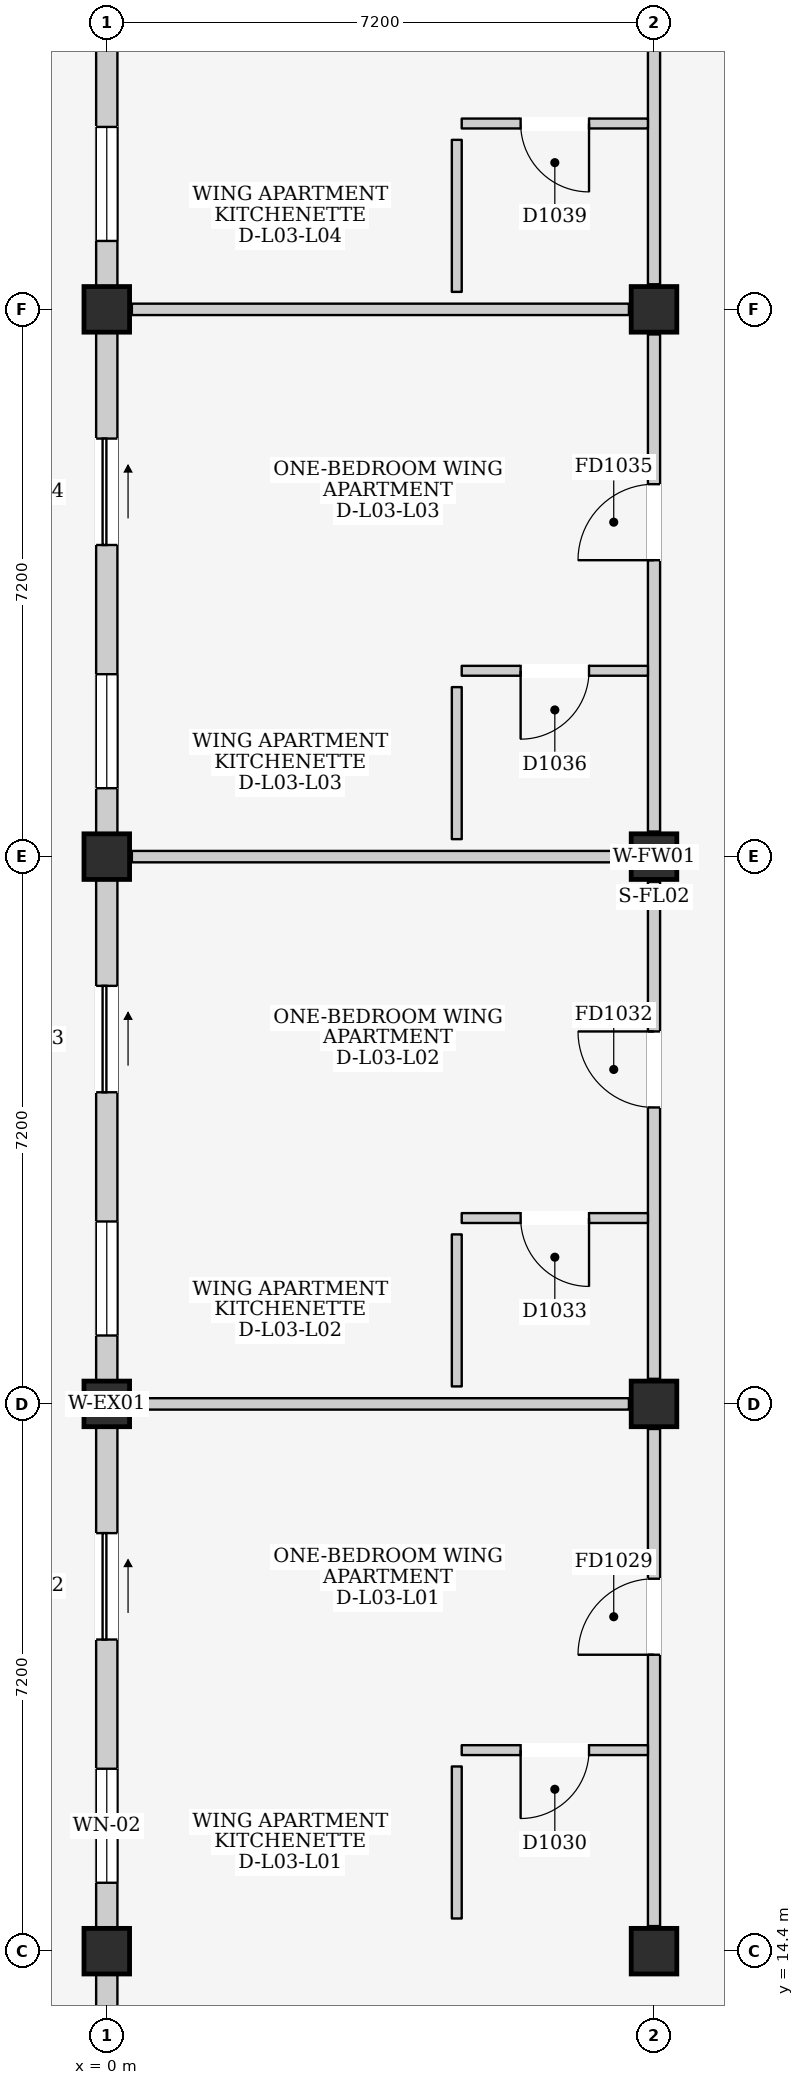
"""IFC4 building model, lengths in metres.
Left out: names, types, materials, properties, quantities, classifications, styles, units other than length and angle.
Written with IfcOpenShell. Run it as: python <this file> out.ifc"""

import sys

from ifc_helpers import new_model, si_unit, direction, frame, frame_2d, origin, origin_2d, place, context, subcontext, project, spatial, rectangle, extrude, element, fill, save


model = new_model("IFC4")
c1 = context("Model", 3, precision=1e-05, world=origin(), true_north=direction((0.0, 1.0)))
c2 = subcontext(c1, "Body", "Model", "MODEL_VIEW")
j1 = project(units=[si_unit("LENGTHUNIT", "METRE"), si_unit("PLANEANGLEUNIT", "RADIAN")], contexts=[c1])
p1 = place(None, origin())
s1 = spatial("IfcSite", under=j1, at=p1, CompositionType="ELEMENT")
p2 = place(p1, origin())
s2 = spatial("IfcBuilding", under=s1, at=p2, CompositionType="ELEMENT")
p3 = place(p2, frame((0.0, 0.0, 12.2)))
s3 = spatial("IfcBuildingStorey", under=s2, at=p3, CompositionType="ELEMENT", Elevation=12.2)
for number, where, z_axis, x_axis in (
    (1, (0.0, 14.4, 0.0), (0.0, 0.0, 1.0), (1.0, 0.0, 0.0)),
    (2, (0.0, 21.6, 0.0), (0.0, 0.0, 1.0), (1.0, 0.0, 0.0)),
    (3, (0.0, 28.8, 0.0), (0.0, 0.0, 1.0), (1.0, 0.0, 0.0)),
    (4, (0.0, 36.0, 0.0), (0.0, 0.0, 1.0), (1.0, 0.0, 0.0)),
    (5, (7.2, 14.4, 0.0), (0.0, 0.0, 1.0), (1.0, 0.0, 0.0)),
    (6, (7.2, 21.6, 0.0), (0.0, 0.0, 1.0), (1.0, 0.0, 0.0)),
    (7, (7.2, 28.8, 0.0), (0.0, 0.0, 1.0), (1.0, 0.0, 0.0)),
    (8, (7.2, 36.0, 0.0), (0.0, 0.0, 1.0), (1.0, 0.0, 0.0)),
):
    element("IfcColumn", number, at=place(p3, frame(where, z_axis=z_axis, x_axis=x_axis)), inside=s3, PredefinedType="COLUMN", context=c2, shape_type="SweptSolid", body=[
        extrude(rectangle(XDim=0.6, YDim=0.6, at=origin_2d()), origin(), (0.0, 0.0, 1.0), 3.2),
    ])
p4 = place(p3, frame((0.0, 7.5, 0.0), z_axis=(0.0, 0.0, 1.0), x_axis=(0.0, 1.0, 0.0)))
e9 = element("IfcWall", 9, at=p4, inside=s3, PredefinedType="ELEMENTEDWALL", context=c2, shape_type="SweptSolid", body=[
    extrude(rectangle(XDim=6.6, YDim=0.28, at=frame_2d((3.3, 0.0))), origin(), (0.0, 0.0, 1.0), 2.445),
])
p5 = place(p4, frame((3.65, 0.0, 0.0)))
e10 = element("IfcOpeningElement", 10, at=p5, cuts=e9, PredefinedType="OPENING", context=c2, shape_type="SweptSolid", body=[
    extrude(rectangle(XDim=1.4, YDim=2.1, at=frame_2d((0.7, 1.05))), frame((0.0, 0.155, 0.0), z_axis=(0.0, -1.0, 0.0), x_axis=(1.0, 0.0, 0.0)), (0.0, 0.0, 1.0), 0.31),
])
p6 = place(p3, frame((0.0, 14.7, 0.0), z_axis=(0.0, 0.0, 1.0), x_axis=(0.0, 1.0, 0.0)))
e11 = element("IfcWall", 11, at=p6, inside=s3, PredefinedType="ELEMENTEDWALL", context=c2, shape_type="SweptSolid", body=[
    extrude(rectangle(XDim=6.6, YDim=0.28, at=frame_2d((3.3, 0.0))), origin(), (0.0, 0.0, 1.0), 2.445),
])
p7 = place(p6, frame((3.8, 0.0, 0.0)))
e12 = element("IfcOpeningElement", 12, at=p7, cuts=e11, PredefinedType="OPENING", context=c2, shape_type="SweptSolid", body=[
    extrude(rectangle(XDim=1.4, YDim=2.1, at=frame_2d((0.7, 1.05))), frame((0.0, 0.155, 0.0), z_axis=(0.0, -1.0, 0.0), x_axis=(1.0, 0.0, 0.0)), (0.0, 0.0, 1.0), 0.31),
])
p8 = place(p6, frame((0.6, 0.0, 0.835)))
e13 = element("IfcOpeningElement", 13, at=p8, cuts=e11, PredefinedType="OPENING", context=c2, shape_type="SweptSolid", body=[
    extrude(rectangle(XDim=1.5, YDim=1.5, at=frame_2d((0.75, 0.75))), frame((0.0, 0.155, 0.0), z_axis=(0.0, -1.0, 0.0), x_axis=(1.0, 0.0, 0.0)), (0.0, 0.0, 1.0), 0.31),
])
p9 = place(p3, frame((0.0, 21.9, 0.0), z_axis=(0.0, 0.0, 1.0), x_axis=(0.0, 1.0, 0.0)))
e14 = element("IfcWall", 14, at=p9, inside=s3, PredefinedType="ELEMENTEDWALL", context=c2, shape_type="SweptSolid", body=[
    extrude(rectangle(XDim=6.6, YDim=0.28, at=frame_2d((3.3, 0.0))), origin(), (0.0, 0.0, 1.0), 2.445),
])
p10 = place(p9, frame((3.8, 0.0, 0.0)))
e15 = element("IfcOpeningElement", 15, at=p10, cuts=e14, PredefinedType="OPENING", context=c2, shape_type="SweptSolid", body=[
    extrude(rectangle(XDim=1.4, YDim=2.1, at=frame_2d((0.7, 1.05))), frame((0.0, 0.155, 0.0), z_axis=(0.0, -1.0, 0.0), x_axis=(1.0, 0.0, 0.0)), (0.0, 0.0, 1.0), 0.31),
])
p11 = place(p9, frame((0.6, 0.0, 0.835)))
e16 = element("IfcOpeningElement", 16, at=p11, cuts=e14, PredefinedType="OPENING", context=c2, shape_type="SweptSolid", body=[
    extrude(rectangle(XDim=1.5, YDim=1.5, at=frame_2d((0.75, 0.75))), frame((0.0, 0.155, 0.0), z_axis=(0.0, -1.0, 0.0), x_axis=(1.0, 0.0, 0.0)), (0.0, 0.0, 1.0), 0.31),
])
p12 = place(p3, frame((0.0, 29.1, 0.0), z_axis=(0.0, 0.0, 1.0), x_axis=(0.0, 1.0, 0.0)))
e17 = element("IfcWall", 17, at=p12, inside=s3, PredefinedType="ELEMENTEDWALL", context=c2, shape_type="SweptSolid", body=[
    extrude(rectangle(XDim=6.6, YDim=0.28, at=frame_2d((3.3, 0.0))), origin(), (0.0, 0.0, 1.0), 2.445),
])
p13 = place(p12, frame((3.8, 0.0, 0.0)))
e18 = element("IfcOpeningElement", 18, at=p13, cuts=e17, PredefinedType="OPENING", context=c2, shape_type="SweptSolid", body=[
    extrude(rectangle(XDim=1.4, YDim=2.1, at=frame_2d((0.7, 1.05))), frame((0.0, 0.155, 0.0), z_axis=(0.0, -1.0, 0.0), x_axis=(1.0, 0.0, 0.0)), (0.0, 0.0, 1.0), 0.31),
])
p14 = place(p12, frame((0.6, 0.0, 0.835)))
e19 = element("IfcOpeningElement", 19, at=p14, cuts=e17, PredefinedType="OPENING", context=c2, shape_type="SweptSolid", body=[
    extrude(rectangle(XDim=1.5, YDim=1.5, at=frame_2d((0.75, 0.75))), frame((0.0, 0.155, 0.0), z_axis=(0.0, -1.0, 0.0), x_axis=(1.0, 0.0, 0.0)), (0.0, 0.0, 1.0), 0.31),
])
p15 = place(p3, frame((0.0, 36.3, 0.0), z_axis=(0.0, 0.0, 1.0), x_axis=(0.0, 1.0, 0.0)))
e20 = element("IfcWall", 20, at=p15, inside=s3, PredefinedType="ELEMENTEDWALL", context=c2, shape_type="SweptSolid", body=[
    extrude(rectangle(XDim=6.6, YDim=0.28, at=frame_2d((3.3, 0.0))), origin(), (0.0, 0.0, 1.0), 2.445),
])
p16 = place(p15, frame((3.8, 0.0, 0.0)))
e21 = element("IfcOpeningElement", 21, at=p16, cuts=e20, PredefinedType="OPENING", context=c2, shape_type="SweptSolid", body=[
    extrude(rectangle(XDim=1.4, YDim=2.1, at=frame_2d((0.7, 1.05))), frame((0.0, 0.155, 0.0), z_axis=(0.0, -1.0, 0.0), x_axis=(1.0, 0.0, 0.0)), (0.0, 0.0, 1.0), 0.31),
])
p17 = place(p15, frame((0.6, 0.0, 0.835)))
e22 = element("IfcOpeningElement", 22, at=p17, cuts=e20, PredefinedType="OPENING", context=c2, shape_type="SweptSolid", body=[
    extrude(rectangle(XDim=1.5, YDim=1.5, at=frame_2d((0.75, 0.75))), frame((0.0, 0.155, 0.0), z_axis=(0.0, -1.0, 0.0), x_axis=(1.0, 0.0, 0.0)), (0.0, 0.0, 1.0), 0.31),
])
p18 = place(p3, frame((7.2, 14.73, 0.0), z_axis=(0.0, 0.0, 1.0), x_axis=(0.0, 1.0, 0.0)))
e23 = element("IfcWall", 23, at=p18, inside=s3, PredefinedType="PARTITIONING", context=c2, shape_type="SweptSolid", body=[
    extrude(rectangle(XDim=6.54, YDim=0.16, at=frame_2d((3.27, 0.0))), origin(), (0.0, 0.0, 1.0), 2.415),
])
p19 = place(p18, frame((3.57, 0.0, 0.0)))
e24 = element("IfcOpeningElement", 24, at=p19, cuts=e23, PredefinedType="OPENING", context=c2, shape_type="SweptSolid", body=[
    extrude(rectangle(XDim=1.0, YDim=2.15, at=frame_2d((0.5, 1.075))), frame((0.0, 0.095, 0.0), z_axis=(0.0, -1.0, 0.0), x_axis=(1.0, 0.0, 0.0)), (0.0, 0.0, 1.0), 0.19),
])
p20 = place(p3, frame((0.33, 21.6, 0.0), z_axis=(0.0, 0.0, 1.0), x_axis=(1.0, 0.0, 0.0)))
e25 = element("IfcWall", 25, at=p20, inside=s3, PredefinedType="PARTITIONING", context=c2, shape_type="SweptSolid", body=[
    extrude(rectangle(XDim=6.54, YDim=0.15, at=frame_2d((3.27, 0.0))), origin(), (0.0, 0.0, 1.0), 2.365),
])
p21 = place(p3, frame((4.67, 17.045, 0.0), z_axis=(0.0, 0.0, 1.0), x_axis=(1.0, 0.0, 0.0)))
e26 = element("IfcWall", 26, at=p21, inside=s3, PredefinedType="PARTITIONING", context=c2, shape_type="SweptSolid", body=[
    extrude(rectangle(XDim=2.45, YDim=0.13, at=frame_2d((1.225, 0.0))), origin(), (0.0, 0.0, 1.0), 2.98),
])
p22 = place(p21, frame((0.775, 0.0, 0.0)))
e27 = element("IfcOpeningElement", 27, at=p22, cuts=e26, PredefinedType="OPENING", context=c2, shape_type="SweptSolid", body=[
    extrude(rectangle(XDim=0.9, YDim=2.1, at=frame_2d((0.45, 1.05))), frame((0.0, 0.08, 0.0), z_axis=(0.0, -1.0, 0.0), x_axis=(1.0, 0.0, 0.0)), (0.0, 0.0, 1.0), 0.16),
])
p23 = place(p3, frame((4.605, 14.83, 0.0), z_axis=(0.0, 0.0, 1.0), x_axis=(0.0, 1.0, 0.0)))
e28 = element("IfcWall", 28, at=p23, inside=s3, PredefinedType="PARTITIONING", context=c2, shape_type="SweptSolid", body=[
    extrude(rectangle(XDim=2.0, YDim=0.13, at=frame_2d((1.0, 0.0))), origin(), (0.0, 0.0, 1.0), 2.98),
])
p24 = place(p3, frame((7.2, 21.93, 0.0), z_axis=(0.0, 0.0, 1.0), x_axis=(0.0, 1.0, 0.0)))
e29 = element("IfcWall", 29, at=p24, inside=s3, PredefinedType="PARTITIONING", context=c2, shape_type="SweptSolid", body=[
    extrude(rectangle(XDim=6.54, YDim=0.16, at=frame_2d((3.27, 0.0))), origin(), (0.0, 0.0, 1.0), 2.415),
])
p25 = place(p24, frame((3.57, 0.0, 0.0)))
e30 = element("IfcOpeningElement", 30, at=p25, cuts=e29, PredefinedType="OPENING", context=c2, shape_type="SweptSolid", body=[
    extrude(rectangle(XDim=1.0, YDim=2.15, at=frame_2d((0.5, 1.075))), frame((0.0, 0.095, 0.0), z_axis=(0.0, -1.0, 0.0), x_axis=(1.0, 0.0, 0.0)), (0.0, 0.0, 1.0), 0.19),
])
p26 = place(p3, frame((0.33, 28.8, 0.0), z_axis=(0.0, 0.0, 1.0), x_axis=(1.0, 0.0, 0.0)))
e31 = element("IfcWall", 31, at=p26, inside=s3, PredefinedType="PARTITIONING", context=c2, shape_type="SweptSolid", body=[
    extrude(rectangle(XDim=6.54, YDim=0.15, at=frame_2d((3.27, 0.0))), origin(), (0.0, 0.0, 1.0), 2.365),
])
p27 = place(p3, frame((4.67, 24.045, 0.0), z_axis=(0.0, 0.0, 1.0), x_axis=(1.0, 0.0, 0.0)))
e32 = element("IfcWall", 32, at=p27, inside=s3, PredefinedType="PARTITIONING", context=c2, shape_type="SweptSolid", body=[
    extrude(rectangle(XDim=2.45, YDim=0.13, at=frame_2d((1.225, 0.0))), origin(), (0.0, 0.0, 1.0), 2.98),
])
p28 = place(p27, frame((0.775, 0.0, 0.0)))
e33 = element("IfcOpeningElement", 33, at=p28, cuts=e32, PredefinedType="OPENING", context=c2, shape_type="SweptSolid", body=[
    extrude(rectangle(XDim=0.9, YDim=2.1, at=frame_2d((0.45, 1.05))), frame((0.0, 0.08, 0.0), z_axis=(0.0, -1.0, 0.0), x_axis=(1.0, 0.0, 0.0)), (0.0, 0.0, 1.0), 0.16),
])
p29 = place(p3, frame((4.605, 21.83, 0.0), z_axis=(0.0, 0.0, 1.0), x_axis=(0.0, 1.0, 0.0)))
e34 = element("IfcWall", 34, at=p29, inside=s3, PredefinedType="PARTITIONING", context=c2, shape_type="SweptSolid", body=[
    extrude(rectangle(XDim=2.0, YDim=0.13, at=frame_2d((1.0, 0.0))), origin(), (0.0, 0.0, 1.0), 2.98),
])
p30 = place(p3, frame((7.2, 29.13, 0.0), z_axis=(0.0, 0.0, 1.0), x_axis=(0.0, 1.0, 0.0)))
e35 = element("IfcWall", 35, at=p30, inside=s3, PredefinedType="PARTITIONING", context=c2, shape_type="SweptSolid", body=[
    extrude(rectangle(XDim=6.54, YDim=0.16, at=frame_2d((3.27, 0.0))), origin(), (0.0, 0.0, 1.0), 2.415),
])
p31 = place(p30, frame((3.57, 0.0, 0.0)))
e36 = element("IfcOpeningElement", 36, at=p31, cuts=e35, PredefinedType="OPENING", context=c2, shape_type="SweptSolid", body=[
    extrude(rectangle(XDim=1.0, YDim=2.15, at=frame_2d((0.5, 1.075))), frame((0.0, 0.095, 0.0), z_axis=(0.0, -1.0, 0.0), x_axis=(1.0, 0.0, 0.0)), (0.0, 0.0, 1.0), 0.19),
])
p32 = place(p3, frame((0.33, 36.0, 0.0), z_axis=(0.0, 0.0, 1.0), x_axis=(1.0, 0.0, 0.0)))
e37 = element("IfcWall", 37, at=p32, inside=s3, PredefinedType="PARTITIONING", context=c2, shape_type="SweptSolid", body=[
    extrude(rectangle(XDim=6.54, YDim=0.15, at=frame_2d((3.27, 0.0))), origin(), (0.0, 0.0, 1.0), 2.365),
])
p33 = place(p3, frame((4.67, 31.245, 0.0), z_axis=(0.0, 0.0, 1.0), x_axis=(1.0, 0.0, 0.0)))
e38 = element("IfcWall", 38, at=p33, inside=s3, PredefinedType="PARTITIONING", context=c2, shape_type="SweptSolid", body=[
    extrude(rectangle(XDim=2.45, YDim=0.13, at=frame_2d((1.225, 0.0))), origin(), (0.0, 0.0, 1.0), 2.98),
])
p34 = place(p33, frame((0.775, 0.0, 0.0)))
e39 = element("IfcOpeningElement", 39, at=p34, cuts=e38, PredefinedType="OPENING", context=c2, shape_type="SweptSolid", body=[
    extrude(rectangle(XDim=0.9, YDim=2.1, at=frame_2d((0.45, 1.05))), frame((0.0, 0.08, 0.0), z_axis=(0.0, -1.0, 0.0), x_axis=(1.0, 0.0, 0.0)), (0.0, 0.0, 1.0), 0.16),
])
p35 = place(p3, frame((4.605, 29.03, 0.0), z_axis=(0.0, 0.0, 1.0), x_axis=(0.0, 1.0, 0.0)))
e40 = element("IfcWall", 40, at=p35, inside=s3, PredefinedType="PARTITIONING", context=c2, shape_type="SweptSolid", body=[
    extrude(rectangle(XDim=2.0, YDim=0.13, at=frame_2d((1.0, 0.0))), origin(), (0.0, 0.0, 1.0), 2.98),
])
p36 = place(p3, frame((7.2, 36.33, 0.0), z_axis=(0.0, 0.0, 1.0), x_axis=(0.0, 1.0, 0.0)))
e41 = element("IfcWall", 41, at=p36, inside=s3, PredefinedType="PARTITIONING", context=c2, shape_type="SweptSolid", body=[
    extrude(rectangle(XDim=6.54, YDim=0.16, at=frame_2d((3.27, 0.0))), origin(), (0.0, 0.0, 1.0), 2.415),
])
p37 = place(p36, frame((3.57, 0.0, 0.0)))
e42 = element("IfcOpeningElement", 42, at=p37, cuts=e41, PredefinedType="OPENING", context=c2, shape_type="SweptSolid", body=[
    extrude(rectangle(XDim=1.0, YDim=2.15, at=frame_2d((0.5, 1.075))), frame((0.0, 0.095, 0.0), z_axis=(0.0, -1.0, 0.0), x_axis=(1.0, 0.0, 0.0)), (0.0, 0.0, 1.0), 0.19),
])
p38 = place(p3, frame((4.67, 38.445, 0.0), z_axis=(0.0, 0.0, 1.0), x_axis=(1.0, 0.0, 0.0)))
e43 = element("IfcWall", 43, at=p38, inside=s3, PredefinedType="PARTITIONING", context=c2, shape_type="SweptSolid", body=[
    extrude(rectangle(XDim=2.45, YDim=0.13, at=frame_2d((1.225, 0.0))), origin(), (0.0, 0.0, 1.0), 2.98),
])
p39 = place(p38, frame((0.775, 0.0, 0.0)))
e44 = element("IfcOpeningElement", 44, at=p39, cuts=e43, PredefinedType="OPENING", context=c2, shape_type="SweptSolid", body=[
    extrude(rectangle(XDim=0.9, YDim=2.1, at=frame_2d((0.45, 1.05))), frame((0.0, 0.08, 0.0), z_axis=(0.0, -1.0, 0.0), x_axis=(1.0, 0.0, 0.0)), (0.0, 0.0, 1.0), 0.16),
])
p40 = place(p3, frame((4.605, 36.23, 0.0), z_axis=(0.0, 0.0, 1.0), x_axis=(0.0, 1.0, 0.0)))
e45 = element("IfcWall", 45, at=p40, inside=s3, PredefinedType="PARTITIONING", context=c2, shape_type="SweptSolid", body=[
    extrude(rectangle(XDim=2.0, YDim=0.13, at=frame_2d((1.0, 0.0))), origin(), (0.0, 0.0, 1.0), 2.98),
])
p41 = place(p7, frame((1.4, 0.0, 0.0), z_axis=(0.0, 0.0, 1.0), x_axis=(-1.0, 0.0, 0.0)))
e46 = element("IfcDoor", 46, at=p41, inside=s3, OperationType="SLIDING_TO_RIGHT", PredefinedType="DOOR", context=c2, shape_type="SweptSolid", body=[
    extrude(rectangle(XDim=1.4, YDim=2.1, at=frame_2d((0.7, 1.05))), frame((0.0, 0.025, 0.0), z_axis=(0.0, -1.0, 0.0), x_axis=(1.0, 0.0, 0.0)), (0.0, 0.0, 1.0), 0.05),
])
fill(e12, e46)
p42 = place(p8, origin())
e47 = element("IfcWindow", 47, at=p42, inside=s3, PartitioningType="DOUBLE_PANEL_VERTICAL", PredefinedType="WINDOW", context=c2, shape_type="SweptSolid", body=[
    extrude(rectangle(XDim=1.5, YDim=1.5, at=frame_2d((0.75, 0.75))), frame((0.0, 0.03, 0.0), z_axis=(0.0, -1.0, 0.0), x_axis=(1.0, 0.0, 0.0)), (0.0, 0.0, 1.0), 0.06),
])
fill(e13, e47)
p43 = place(p10, frame((1.4, 0.0, 0.0), z_axis=(0.0, 0.0, 1.0), x_axis=(-1.0, 0.0, 0.0)))
e48 = element("IfcDoor", 48, at=p43, inside=s3, OperationType="SLIDING_TO_RIGHT", PredefinedType="DOOR", context=c2, shape_type="SweptSolid", body=[
    extrude(rectangle(XDim=1.4, YDim=2.1, at=frame_2d((0.7, 1.05))), frame((0.0, 0.025, 0.0), z_axis=(0.0, -1.0, 0.0), x_axis=(1.0, 0.0, 0.0)), (0.0, 0.0, 1.0), 0.05),
])
fill(e15, e48)
p44 = place(p11, origin())
e49 = element("IfcWindow", 49, at=p44, inside=s3, PartitioningType="DOUBLE_PANEL_VERTICAL", PredefinedType="WINDOW", context=c2, shape_type="SweptSolid", body=[
    extrude(rectangle(XDim=1.5, YDim=1.5, at=frame_2d((0.75, 0.75))), frame((0.0, 0.03, 0.0), z_axis=(0.0, -1.0, 0.0), x_axis=(1.0, 0.0, 0.0)), (0.0, 0.0, 1.0), 0.06),
])
fill(e16, e49)
p45 = place(p13, frame((1.4, 0.0, 0.0), z_axis=(0.0, 0.0, 1.0), x_axis=(-1.0, 0.0, 0.0)))
e50 = element("IfcDoor", 50, at=p45, inside=s3, OperationType="SLIDING_TO_RIGHT", PredefinedType="DOOR", context=c2, shape_type="SweptSolid", body=[
    extrude(rectangle(XDim=1.4, YDim=2.1, at=frame_2d((0.7, 1.05))), frame((0.0, 0.025, 0.0), z_axis=(0.0, -1.0, 0.0), x_axis=(1.0, 0.0, 0.0)), (0.0, 0.0, 1.0), 0.05),
])
fill(e18, e50)
p46 = place(p14, origin())
e51 = element("IfcWindow", 51, at=p46, inside=s3, PartitioningType="DOUBLE_PANEL_VERTICAL", PredefinedType="WINDOW", context=c2, shape_type="SweptSolid", body=[
    extrude(rectangle(XDim=1.5, YDim=1.5, at=frame_2d((0.75, 0.75))), frame((0.0, 0.03, 0.0), z_axis=(0.0, -1.0, 0.0), x_axis=(1.0, 0.0, 0.0)), (0.0, 0.0, 1.0), 0.06),
])
fill(e19, e51)
p47 = place(p17, origin())
e52 = element("IfcWindow", 52, at=p47, inside=s3, PartitioningType="DOUBLE_PANEL_VERTICAL", PredefinedType="WINDOW", context=c2, shape_type="SweptSolid", body=[
    extrude(rectangle(XDim=1.5, YDim=1.5, at=frame_2d((0.75, 0.75))), frame((0.0, 0.03, 0.0), z_axis=(0.0, -1.0, 0.0), x_axis=(1.0, 0.0, 0.0)), (0.0, 0.0, 1.0), 0.06),
])
fill(e22, e52)
p48 = place(p19, origin())
e53 = element("IfcDoor", 53, at=p48, inside=s3, OperationType="SINGLE_SWING_LEFT", PredefinedType="DOOR", context=c2, shape_type="SweptSolid", body=[
    extrude(rectangle(XDim=1.0, YDim=2.15, at=frame_2d((0.5, 1.075))), frame((0.0, 0.025, 0.0), z_axis=(0.0, -1.0, 0.0), x_axis=(1.0, 0.0, 0.0)), (0.0, 0.0, 1.0), 0.05),
])
fill(e24, e53)
p49 = place(p22, frame((0.9, 0.0, 0.0), z_axis=(0.0, 0.0, 1.0), x_axis=(-1.0, 0.0, 0.0)))
e54 = element("IfcDoor", 54, at=p49, inside=s3, OperationType="SINGLE_SWING_RIGHT", PredefinedType="DOOR", context=c2, shape_type="SweptSolid", body=[
    extrude(rectangle(XDim=0.9, YDim=2.1, at=frame_2d((0.45, 1.05))), frame((0.0, 0.025, 0.0), z_axis=(0.0, -1.0, 0.0), x_axis=(1.0, 0.0, 0.0)), (0.0, 0.0, 1.0), 0.05),
])
fill(e27, e54)
p50 = place(p25, origin())
e55 = element("IfcDoor", 55, at=p50, inside=s3, OperationType="SINGLE_SWING_RIGHT", PredefinedType="DOOR", context=c2, shape_type="SweptSolid", body=[
    extrude(rectangle(XDim=1.0, YDim=2.15, at=frame_2d((0.5, 1.075))), frame((0.0, 0.025, 0.0), z_axis=(0.0, -1.0, 0.0), x_axis=(1.0, 0.0, 0.0)), (0.0, 0.0, 1.0), 0.05),
])
fill(e30, e55)
p51 = place(p28, frame((0.9, 0.0, 0.0), z_axis=(0.0, 0.0, 1.0), x_axis=(-1.0, 0.0, 0.0)))
e56 = element("IfcDoor", 56, at=p51, inside=s3, OperationType="SINGLE_SWING_LEFT", PredefinedType="DOOR", context=c2, shape_type="SweptSolid", body=[
    extrude(rectangle(XDim=0.9, YDim=2.1, at=frame_2d((0.45, 1.05))), frame((0.0, 0.025, 0.0), z_axis=(0.0, -1.0, 0.0), x_axis=(1.0, 0.0, 0.0)), (0.0, 0.0, 1.0), 0.05),
])
fill(e33, e56)
p52 = place(p31, origin())
e57 = element("IfcDoor", 57, at=p52, inside=s3, OperationType="SINGLE_SWING_LEFT", PredefinedType="DOOR", context=c2, shape_type="SweptSolid", body=[
    extrude(rectangle(XDim=1.0, YDim=2.15, at=frame_2d((0.5, 1.075))), frame((0.0, 0.025, 0.0), z_axis=(0.0, -1.0, 0.0), x_axis=(1.0, 0.0, 0.0)), (0.0, 0.0, 1.0), 0.05),
])
fill(e36, e57)
p53 = place(p34, frame((0.9, 0.0, 0.0), z_axis=(0.0, 0.0, 1.0), x_axis=(-1.0, 0.0, 0.0)))
e58 = element("IfcDoor", 58, at=p53, inside=s3, OperationType="SINGLE_SWING_RIGHT", PredefinedType="DOOR", context=c2, shape_type="SweptSolid", body=[
    extrude(rectangle(XDim=0.9, YDim=2.1, at=frame_2d((0.45, 1.05))), frame((0.0, 0.025, 0.0), z_axis=(0.0, -1.0, 0.0), x_axis=(1.0, 0.0, 0.0)), (0.0, 0.0, 1.0), 0.05),
])
fill(e39, e58)
p54 = place(p39, frame((0.9, 0.0, 0.0), z_axis=(0.0, 0.0, 1.0), x_axis=(-1.0, 0.0, 0.0)))
e59 = element("IfcDoor", 59, at=p54, inside=s3, OperationType="SINGLE_SWING_LEFT", PredefinedType="DOOR", context=c2, shape_type="SweptSolid", body=[
    extrude(rectangle(XDim=0.9, YDim=2.1, at=frame_2d((0.45, 1.05))), frame((0.0, 0.025, 0.0), z_axis=(0.0, -1.0, 0.0), x_axis=(1.0, 0.0, 0.0)), (0.0, 0.0, 1.0), 0.05),
])
fill(e44, e59)
save(model, sys.argv[1])
